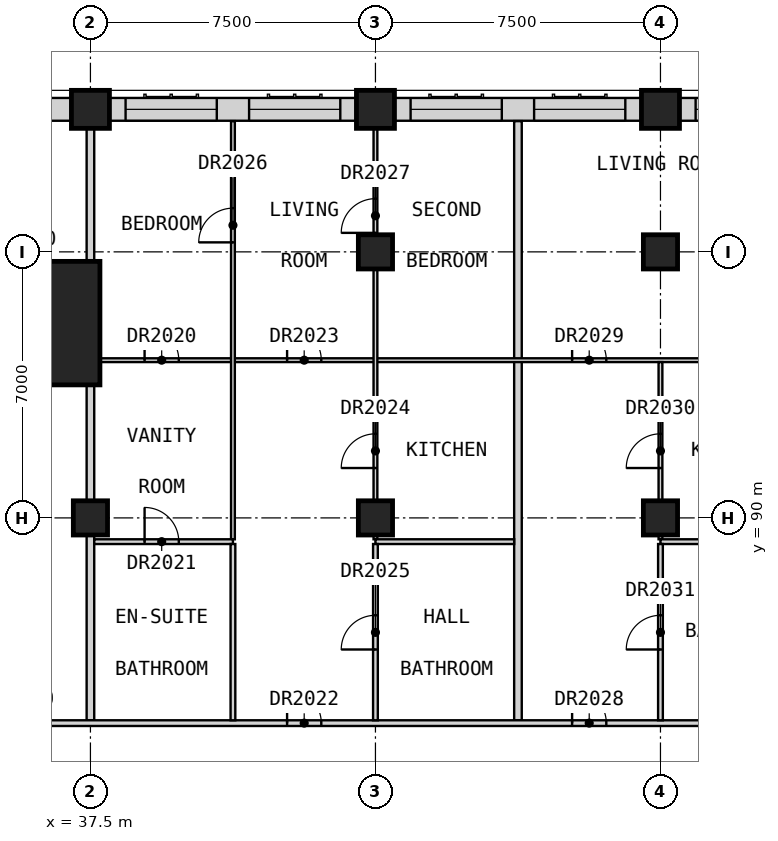
"""IFC4 building model, lengths in metres.
Left out: names, types, materials, properties, quantities, classifications, styles, units other than length and angle.
Written with IfcOpenShell. Run it as: python <this file> out.ifc"""

import sys

from ifc_helpers import new_model, si_unit, direction, frame, frame_2d, origin, origin_2d, place, context, subcontext, project, spatial, rectangle, extrude, element, fill, save


model = new_model("IFC4")
c1 = context("Model", 3, precision=1e-05, world=origin(), true_north=direction((0.0, 1.0)))
c2 = subcontext(c1, "Body", "Model", "MODEL_VIEW")
j1 = project(units=[si_unit("LENGTHUNIT", "METRE"), si_unit("PLANEANGLEUNIT", "RADIAN")], contexts=[c1])
p1 = place(None, origin())
s1 = spatial("IfcSite", under=j1, at=p1, CompositionType="ELEMENT")
p2 = place(p1, origin())
s2 = spatial("IfcBuilding", under=s1, at=p2, CompositionType="ELEMENT")
p3 = place(p2, frame((0.0, 0.0, 210.7)))
s3 = spatial("IfcBuildingStorey", under=s2, at=p3, CompositionType="ELEMENT", Elevation=210.7)
for number, where, z_axis, x_axis in (
    (1, (37.5, 100.75, 0.0), (0.0, 0.0, 1.0), (1.0, 0.0, 0.0)),
    (2, (45.0, 100.75, 0.0), (0.0, 0.0, 1.0), (1.0, 0.0, 0.0)),
    (3, (52.5, 100.75, 0.0), (0.0, 0.0, 1.0), (1.0, 0.0, 0.0)),
):
    element("IfcColumn", number, at=place(p3, frame(where, z_axis=z_axis, x_axis=x_axis)), inside=s3, PredefinedType="COLUMN", context=c2, shape_type="SweptSolid", body=[
        extrude(rectangle(XDim=1.0, YDim=1.0, at=origin_2d()), origin(), (0.0, 0.0, 1.0), 3.5),
    ])
for number, where, z_axis, x_axis in (
    (4, (37.5, 90.0, 0.0), (0.0, 0.0, 1.0), (1.0, 0.0, 0.0)),
    (5, (45.0, 90.0, 0.0), (0.0, 0.0, 1.0), (1.0, 0.0, 0.0)),
    (6, (45.0, 97.0, 0.0), (0.0, 0.0, 1.0), (1.0, 0.0, 0.0)),
    (7, (52.5, 90.0, 0.0), (0.0, 0.0, 1.0), (1.0, 0.0, 0.0)),
    (8, (52.5, 97.0, 0.0), (0.0, 0.0, 1.0), (1.0, 0.0, 0.0)),
):
    element("IfcColumn", number, at=place(p3, frame(where, z_axis=z_axis, x_axis=x_axis)), inside=s3, PredefinedType="COLUMN", context=c2, shape_type="SweptSolid", body=[
        extrude(rectangle(XDim=0.9, YDim=0.9, at=origin_2d()), origin(), (0.0, 0.0, 1.0), 3.5),
    ])
p4 = place(p3, frame((36.125, 95.125, 0.0), z_axis=(0.0, 0.0, 1.0), x_axis=(1.0, 0.0, 0.0)))
e9 = element("IfcColumn", 9, at=p4, inside=s3, PredefinedType="COLUMN", context=c2, shape_type="SweptSolid", body=[
    extrude(rectangle(XDim=3.25, YDim=3.25, at=origin_2d()), origin(), (0.0, 0.0, 1.0), 3.5),
])
p5 = place(p3, frame((59.5, 100.75, 0.0), z_axis=(0.0, 0.0, 1.0), x_axis=(-1.0, 0.0, 0.0)))
e10 = element("IfcWall", 10, at=p5, inside=s3, PredefinedType="SOLIDWALL", context=c2, shape_type="SweptSolid", body=[
    extrude(rectangle(XDim=6.5, YDim=0.6, at=frame_2d((3.25, 0.0))), origin(), (0.0, 0.0, 1.0), 2.75),
])
p6 = place(p5, frame((3.675, 0.0, 0.8)))
e11 = element("IfcOpeningElement", 11, at=p6, cuts=e10, PredefinedType="OPENING", context=c2, shape_type="SweptSolid", body=[
    extrude(rectangle(XDim=2.4, YDim=1.8, at=frame_2d((1.2, 0.9))), frame((0.0, 0.31, 0.0), z_axis=(0.0, -1.0, 0.0), x_axis=(1.0, 0.0, 0.0)), (0.0, 0.0, 1.0), 0.62),
])
p7 = place(p5, frame((0.425, 0.0, 0.8)))
e12 = element("IfcOpeningElement", 12, at=p7, cuts=e10, PredefinedType="OPENING", context=c2, shape_type="SweptSolid", body=[
    extrude(rectangle(XDim=2.4, YDim=1.8, at=frame_2d((1.2, 0.9))), frame((0.0, 0.31, 0.0), z_axis=(0.0, -1.0, 0.0), x_axis=(1.0, 0.0, 0.0)), (0.0, 0.0, 1.0), 0.62),
])
p8 = place(p3, frame((52.0, 100.75, 0.0), z_axis=(0.0, 0.0, 1.0), x_axis=(-1.0, 0.0, 0.0)))
e13 = element("IfcWall", 13, at=p8, inside=s3, PredefinedType="SOLIDWALL", context=c2, shape_type="SweptSolid", body=[
    extrude(rectangle(XDim=6.5, YDim=0.6, at=frame_2d((3.25, 0.0))), origin(), (0.0, 0.0, 1.0), 2.75),
])
p9 = place(p8, frame((3.675, 0.0, 0.8)))
e14 = element("IfcOpeningElement", 14, at=p9, cuts=e13, PredefinedType="OPENING", context=c2, shape_type="SweptSolid", body=[
    extrude(rectangle(XDim=2.4, YDim=1.8, at=frame_2d((1.2, 0.9))), frame((0.0, 0.31, 0.0), z_axis=(0.0, -1.0, 0.0), x_axis=(1.0, 0.0, 0.0)), (0.0, 0.0, 1.0), 0.62),
])
p10 = place(p8, frame((0.425, 0.0, 0.8)))
e15 = element("IfcOpeningElement", 15, at=p10, cuts=e13, PredefinedType="OPENING", context=c2, shape_type="SweptSolid", body=[
    extrude(rectangle(XDim=2.4, YDim=1.8, at=frame_2d((1.2, 0.9))), frame((0.0, 0.31, 0.0), z_axis=(0.0, -1.0, 0.0), x_axis=(1.0, 0.0, 0.0)), (0.0, 0.0, 1.0), 0.62),
])
p11 = place(p3, frame((44.5, 100.75, 0.0), z_axis=(0.0, 0.0, 1.0), x_axis=(-1.0, 0.0, 0.0)))
e16 = element("IfcWall", 16, at=p11, inside=s3, PredefinedType="SOLIDWALL", context=c2, shape_type="SweptSolid", body=[
    extrude(rectangle(XDim=6.5, YDim=0.6, at=frame_2d((3.25, 0.0))), origin(), (0.0, 0.0, 1.0), 2.75),
])
p12 = place(p11, frame((3.675, 0.0, 0.8)))
e17 = element("IfcOpeningElement", 17, at=p12, cuts=e16, PredefinedType="OPENING", context=c2, shape_type="SweptSolid", body=[
    extrude(rectangle(XDim=2.4, YDim=1.8, at=frame_2d((1.2, 0.9))), frame((0.0, 0.31, 0.0), z_axis=(0.0, -1.0, 0.0), x_axis=(1.0, 0.0, 0.0)), (0.0, 0.0, 1.0), 0.62),
])
p13 = place(p11, frame((0.425, 0.0, 0.8)))
e18 = element("IfcOpeningElement", 18, at=p13, cuts=e16, PredefinedType="OPENING", context=c2, shape_type="SweptSolid", body=[
    extrude(rectangle(XDim=2.4, YDim=1.8, at=frame_2d((1.2, 0.9))), frame((0.0, 0.31, 0.0), z_axis=(0.0, -1.0, 0.0), x_axis=(1.0, 0.0, 0.0)), (0.0, 0.0, 1.0), 0.62),
])
p14 = place(p3, frame((37.0, 100.75, 0.0), z_axis=(0.0, 0.0, 1.0), x_axis=(-1.0, 0.0, 0.0)))
e19 = element("IfcWall", 19, at=p14, inside=s3, PredefinedType="SOLIDWALL", context=c2, shape_type="SweptSolid", body=[
    extrude(rectangle(XDim=2.5, YDim=0.6, at=frame_2d((1.25, 0.0))), origin(), (0.0, 0.0, 1.0), 3.1),
])
p15 = place(p3, frame((37.5, 84.675, 0.0), z_axis=(0.0, 0.0, 1.0), x_axis=(0.0, 1.0, 0.0)))
e20 = element("IfcWall", 20, at=p15, inside=s3, PredefinedType="PARTITIONING", context=c2, shape_type="SweptSolid", body=[
    extrude(rectangle(XDim=16.575, YDim=0.2, at=frame_2d((8.288, 0.0))), origin(), (0.0, 0.0, 1.0), 2.75),
])
p16 = place(p3, frame((48.75, 84.675, 0.0), z_axis=(0.0, 0.0, 1.0), x_axis=(0.0, 1.0, 0.0)))
e21 = element("IfcWall", 21, at=p16, inside=s3, PredefinedType="PARTITIONING", context=c2, shape_type="SweptSolid", body=[
    extrude(rectangle(XDim=15.765, YDim=0.2, at=frame_2d((7.882, 0.0))), origin(), (0.0, 0.0, 1.0), 3.1),
])
p17 = place(p3, frame((33.75, 84.6, 0.0), z_axis=(0.0, 0.0, 1.0), x_axis=(1.0, 0.0, 0.0)))
e22 = element("IfcWall", 22, at=p17, inside=s3, PredefinedType="PARTITIONING", context=c2, shape_type="SweptSolid", body=[
    extrude(rectangle(XDim=28.35, YDim=0.15, at=frame_2d((14.175, 0.0))), origin(), (0.0, 0.0, 1.0), 3.1),
])
p18 = place(p17, frame((1.375, 0.0, 0.0)))
e23 = element("IfcOpeningElement", 23, at=p18, cuts=e22, PredefinedType="OPENING", context=c2, shape_type="SweptSolid", body=[
    extrude(rectangle(XDim=1.0, YDim=2.1, at=frame_2d((0.5, 1.05))), frame((0.0, 0.085, 0.0), z_axis=(0.0, -1.0, 0.0), x_axis=(1.0, 0.0, 0.0)), (0.0, 0.0, 1.0), 0.17),
])
p19 = place(p17, frame((8.925, 0.0, 0.0)))
e24 = element("IfcOpeningElement", 24, at=p19, cuts=e22, PredefinedType="OPENING", context=c2, shape_type="SweptSolid", body=[
    extrude(rectangle(XDim=0.9, YDim=2.1, at=frame_2d((0.45, 1.05))), frame((0.0, 0.085, 0.0), z_axis=(0.0, -1.0, 0.0), x_axis=(1.0, 0.0, 0.0)), (0.0, 0.0, 1.0), 0.17),
])
p20 = place(p17, frame((16.425, 0.0, 0.0)))
e25 = element("IfcOpeningElement", 25, at=p20, cuts=e22, PredefinedType="OPENING", context=c2, shape_type="SweptSolid", body=[
    extrude(rectangle(XDim=0.9, YDim=2.1, at=frame_2d((0.45, 1.05))), frame((0.0, 0.085, 0.0), z_axis=(0.0, -1.0, 0.0), x_axis=(1.0, 0.0, 0.0)), (0.0, 0.0, 1.0), 0.17),
])
p21 = place(p3, frame((37.6, 94.15, 0.0), z_axis=(0.0, 0.0, 1.0), x_axis=(1.0, 0.0, 0.0)))
e26 = element("IfcWall", 26, at=p21, inside=s3, PredefinedType="PARTITIONING", context=c2, shape_type="SweptSolid", body=[
    extrude(rectangle(XDim=22.3, YDim=0.1, at=frame_2d((11.15, 0.0))), origin(), (0.0, 0.0, 1.0), 3.1),
])
p22 = place(p21, frame((1.325, 0.0, 0.0)))
e27 = element("IfcOpeningElement", 27, at=p22, cuts=e26, PredefinedType="OPENING", context=c2, shape_type="SweptSolid", body=[
    extrude(rectangle(XDim=0.9, YDim=2.1, at=frame_2d((0.45, 1.05))), frame((0.0, 0.06, 0.0), z_axis=(0.0, -1.0, 0.0), x_axis=(1.0, 0.0, 0.0)), (0.0, 0.0, 1.0), 0.12),
])
p23 = place(p21, frame((5.075, 0.0, 0.0)))
e28 = element("IfcOpeningElement", 28, at=p23, cuts=e26, PredefinedType="OPENING", context=c2, shape_type="SweptSolid", body=[
    extrude(rectangle(XDim=0.9, YDim=2.1, at=frame_2d((0.45, 1.05))), frame((0.0, 0.06, 0.0), z_axis=(0.0, -1.0, 0.0), x_axis=(1.0, 0.0, 0.0)), (0.0, 0.0, 1.0), 0.12),
])
p24 = place(p21, frame((12.575, 0.0, 0.0)))
e29 = element("IfcOpeningElement", 29, at=p24, cuts=e26, PredefinedType="OPENING", context=c2, shape_type="SweptSolid", body=[
    extrude(rectangle(XDim=0.9, YDim=2.1, at=frame_2d((0.45, 1.05))), frame((0.0, 0.06, 0.0), z_axis=(0.0, -1.0, 0.0), x_axis=(1.0, 0.0, 0.0)), (0.0, 0.0, 1.0), 0.12),
])
p25 = place(p21, frame((20.075, 0.0, 0.0)))
e30 = element("IfcOpeningElement", 30, at=p25, cuts=e26, PredefinedType="OPENING", context=c2, shape_type="SweptSolid", body=[
    extrude(rectangle(XDim=0.9, YDim=2.1, at=frame_2d((0.45, 1.05))), frame((0.0, 0.06, 0.0), z_axis=(0.0, -1.0, 0.0), x_axis=(1.0, 0.0, 0.0)), (0.0, 0.0, 1.0), 0.12),
])
p26 = place(p3, frame((41.25, 89.438, 0.0), z_axis=(0.0, 0.0, 1.0), x_axis=(0.0, 1.0, 0.0)))
e31 = element("IfcWall", 31, at=p26, inside=s3, PredefinedType="PARTITIONING", context=c2, shape_type="SweptSolid", body=[
    extrude(rectangle(XDim=11.002, YDim=0.1, at=frame_2d((5.501, 0.0))), origin(), (0.0, 0.0, 1.0), 3.1),
])
p27 = place(p26, frame((7.812, 0.0, 0.0)))
e32 = element("IfcOpeningElement", 32, at=p27, cuts=e31, PredefinedType="OPENING", context=c2, shape_type="SweptSolid", body=[
    extrude(rectangle(XDim=0.9, YDim=2.1, at=frame_2d((0.45, 1.05))), frame((0.0, 0.06, 0.0), z_axis=(0.0, -1.0, 0.0), x_axis=(1.0, 0.0, 0.0)), (0.0, 0.0, 1.0), 0.12),
])
p28 = place(p3, frame((45.0, 89.438, 0.0), z_axis=(0.0, 0.0, 1.0), x_axis=(0.0, 1.0, 0.0)))
e33 = element("IfcWall", 33, at=p28, inside=s3, PredefinedType="PARTITIONING", context=c2, shape_type="SweptSolid", body=[
    extrude(rectangle(XDim=11.812, YDim=0.1, at=frame_2d((5.906, 0.0))), origin(), (0.0, 0.0, 1.0), 3.1),
])
p29 = place(p28, frame((1.875, 0.0, 0.0)))
e34 = element("IfcOpeningElement", 34, at=p29, cuts=e33, PredefinedType="OPENING", context=c2, shape_type="SweptSolid", body=[
    extrude(rectangle(XDim=0.9, YDim=2.1, at=frame_2d((0.45, 1.05))), frame((0.0, 0.06, 0.0), z_axis=(0.0, -1.0, 0.0), x_axis=(1.0, 0.0, 0.0)), (0.0, 0.0, 1.0), 0.12),
])
p30 = place(p28, frame((8.062, 0.0, 0.0)))
e35 = element("IfcOpeningElement", 35, at=p30, cuts=e33, PredefinedType="OPENING", context=c2, shape_type="SweptSolid", body=[
    extrude(rectangle(XDim=0.9, YDim=2.1, at=frame_2d((0.45, 1.05))), frame((0.0, 0.06, 0.0), z_axis=(0.0, -1.0, 0.0), x_axis=(1.0, 0.0, 0.0)), (0.0, 0.0, 1.0), 0.12),
])
p31 = place(p3, frame((52.5, 89.438, 0.0), z_axis=(0.0, 0.0, 1.0), x_axis=(0.0, 1.0, 0.0)))
e36 = element("IfcWall", 36, at=p31, inside=s3, PredefinedType="PARTITIONING", context=c2, shape_type="SweptSolid", body=[
    extrude(rectangle(XDim=4.663, YDim=0.1, at=frame_2d((2.331, 0.0))), origin(), (0.0, 0.0, 1.0), 3.1),
])
p32 = place(p31, frame((1.875, 0.0, 0.0)))
e37 = element("IfcOpeningElement", 37, at=p32, cuts=e36, PredefinedType="OPENING", context=c2, shape_type="SweptSolid", body=[
    extrude(rectangle(XDim=0.9, YDim=2.1, at=frame_2d((0.45, 1.05))), frame((0.0, 0.06, 0.0), z_axis=(0.0, -1.0, 0.0), x_axis=(1.0, 0.0, 0.0)), (0.0, 0.0, 1.0), 0.12),
])
p33 = place(p3, frame((37.6, 89.375, 0.0), z_axis=(0.0, 0.0, 1.0), x_axis=(1.0, 0.0, 0.0)))
e38 = element("IfcWall", 38, at=p33, inside=s3, PredefinedType="PARTITIONING", context=c2, shape_type="SweptSolid", body=[
    extrude(rectangle(XDim=3.65, YDim=0.125, at=frame_2d((1.825, 0.0))), origin(), (0.0, 0.0, 1.0), 3.1),
])
p34 = place(p33, frame((1.325, 0.0, 0.0)))
e39 = element("IfcOpeningElement", 39, at=p34, cuts=e38, PredefinedType="OPENING", context=c2, shape_type="SweptSolid", body=[
    extrude(rectangle(XDim=0.9, YDim=2.1, at=frame_2d((0.45, 1.05))), frame((0.0, 0.073, 0.0), z_axis=(0.0, -1.0, 0.0), x_axis=(1.0, 0.0, 0.0)), (0.0, 0.0, 1.0), 0.145),
])
p35 = place(p3, frame((45.0, 89.375, 0.0), z_axis=(0.0, 0.0, 1.0), x_axis=(1.0, 0.0, 0.0)))
e40 = element("IfcWall", 40, at=p35, inside=s3, PredefinedType="PARTITIONING", context=c2, shape_type="SweptSolid", body=[
    extrude(rectangle(XDim=3.65, YDim=0.125, at=frame_2d((1.825, 0.0))), origin(), (0.0, 0.0, 1.0), 3.1),
])
p36 = place(p3, frame((52.5, 89.375, 0.0), z_axis=(0.0, 0.0, 1.0), x_axis=(1.0, 0.0, 0.0)))
e41 = element("IfcWall", 41, at=p36, inside=s3, PredefinedType="PARTITIONING", context=c2, shape_type="SweptSolid", body=[
    extrude(rectangle(XDim=7.4, YDim=0.125, at=frame_2d((3.7, 0.0))), origin(), (0.0, 0.0, 1.0), 3.1),
])
p37 = place(p36, frame((5.175, 0.0, 0.0)))
e42 = element("IfcOpeningElement", 42, at=p37, cuts=e41, PredefinedType="OPENING", context=c2, shape_type="SweptSolid", body=[
    extrude(rectangle(XDim=0.9, YDim=2.1, at=frame_2d((0.45, 1.05))), frame((0.0, 0.073, 0.0), z_axis=(0.0, -1.0, 0.0), x_axis=(1.0, 0.0, 0.0)), (0.0, 0.0, 1.0), 0.145),
])
p38 = place(p3, frame((41.25, 84.675, 0.0), z_axis=(0.0, 0.0, 1.0), x_axis=(0.0, 1.0, 0.0)))
e43 = element("IfcWall", 43, at=p38, inside=s3, PredefinedType="PARTITIONING", context=c2, shape_type="SweptSolid", body=[
    extrude(rectangle(XDim=4.637, YDim=0.125, at=frame_2d((2.319, 0.0))), origin(), (0.0, 0.0, 1.0), 3.1),
])
p39 = place(p3, frame((45.0, 84.675, 0.0), z_axis=(0.0, 0.0, 1.0), x_axis=(0.0, 1.0, 0.0)))
e44 = element("IfcWall", 44, at=p39, inside=s3, PredefinedType="PARTITIONING", context=c2, shape_type="SweptSolid", body=[
    extrude(rectangle(XDim=4.637, YDim=0.125, at=frame_2d((2.319, 0.0))), origin(), (0.0, 0.0, 1.0), 3.1),
])
p40 = place(p39, frame((1.863, 0.0, 0.0)))
e45 = element("IfcOpeningElement", 45, at=p40, cuts=e44, PredefinedType="OPENING", context=c2, shape_type="SweptSolid", body=[
    extrude(rectangle(XDim=0.9, YDim=2.1, at=frame_2d((0.45, 1.05))), frame((0.0, 0.073, 0.0), z_axis=(0.0, -1.0, 0.0), x_axis=(1.0, 0.0, 0.0)), (0.0, 0.0, 1.0), 0.145),
])
p41 = place(p3, frame((52.5, 84.675, 0.0), z_axis=(0.0, 0.0, 1.0), x_axis=(0.0, 1.0, 0.0)))
e46 = element("IfcWall", 46, at=p41, inside=s3, PredefinedType="PARTITIONING", context=c2, shape_type="SweptSolid", body=[
    extrude(rectangle(XDim=4.637, YDim=0.125, at=frame_2d((2.319, 0.0))), origin(), (0.0, 0.0, 1.0), 3.1),
])
p42 = place(p41, frame((1.863, 0.0, 0.0)))
e47 = element("IfcOpeningElement", 47, at=p42, cuts=e46, PredefinedType="OPENING", context=c2, shape_type="SweptSolid", body=[
    extrude(rectangle(XDim=0.9, YDim=2.1, at=frame_2d((0.45, 1.05))), frame((0.0, 0.073, 0.0), z_axis=(0.0, -1.0, 0.0), x_axis=(1.0, 0.0, 0.0)), (0.0, 0.0, 1.0), 0.145),
])
p43 = place(p6, origin())
e48 = element("IfcWindow", 48, at=p43, inside=s3, PartitioningType="SINGLE_PANEL", PredefinedType="WINDOW", context=c2, shape_type="SweptSolid", body=[
    extrude(rectangle(XDim=2.4, YDim=1.8, at=frame_2d((1.2, 0.9))), frame((0.0, -0.07, 0.0), z_axis=(0.0, -1.0, 0.0), x_axis=(1.0, 0.0, 0.0)), (0.0, 0.0, 1.0), 0.06),
])
fill(e11, e48)
p44 = place(p9, origin())
e49 = element("IfcWindow", 49, at=p44, inside=s3, PartitioningType="SINGLE_PANEL", PredefinedType="WINDOW", context=c2, shape_type="SweptSolid", body=[
    extrude(rectangle(XDim=2.4, YDim=1.8, at=frame_2d((1.2, 0.9))), frame((0.0, -0.07, 0.0), z_axis=(0.0, -1.0, 0.0), x_axis=(1.0, 0.0, 0.0)), (0.0, 0.0, 1.0), 0.06),
])
fill(e14, e49)
p45 = place(p10, origin())
e50 = element("IfcWindow", 50, at=p45, inside=s3, PartitioningType="SINGLE_PANEL", PredefinedType="WINDOW", context=c2, shape_type="SweptSolid", body=[
    extrude(rectangle(XDim=2.4, YDim=1.8, at=frame_2d((1.2, 0.9))), frame((0.0, -0.07, 0.0), z_axis=(0.0, -1.0, 0.0), x_axis=(1.0, 0.0, 0.0)), (0.0, 0.0, 1.0), 0.06),
])
fill(e15, e50)
p46 = place(p12, origin())
e51 = element("IfcWindow", 51, at=p46, inside=s3, PartitioningType="SINGLE_PANEL", PredefinedType="WINDOW", context=c2, shape_type="SweptSolid", body=[
    extrude(rectangle(XDim=2.4, YDim=1.8, at=frame_2d((1.2, 0.9))), frame((0.0, -0.07, 0.0), z_axis=(0.0, -1.0, 0.0), x_axis=(1.0, 0.0, 0.0)), (0.0, 0.0, 1.0), 0.06),
])
fill(e17, e51)
p47 = place(p13, origin())
e52 = element("IfcWindow", 52, at=p47, inside=s3, PartitioningType="SINGLE_PANEL", PredefinedType="WINDOW", context=c2, shape_type="SweptSolid", body=[
    extrude(rectangle(XDim=2.4, YDim=1.8, at=frame_2d((1.2, 0.9))), frame((0.0, -0.07, 0.0), z_axis=(0.0, -1.0, 0.0), x_axis=(1.0, 0.0, 0.0)), (0.0, 0.0, 1.0), 0.06),
])
fill(e18, e52)
p48 = place(p22, origin())
e53 = element("IfcDoor", 53, at=p48, inside=s3, OperationType="SINGLE_SWING_RIGHT", PredefinedType="DOOR", context=c2, shape_type="SweptSolid", body=[
    extrude(rectangle(XDim=0.9, YDim=2.1, at=frame_2d((0.45, 1.05))), frame((0.0, 0.025, 0.0), z_axis=(0.0, -1.0, 0.0), x_axis=(1.0, 0.0, 0.0)), (0.0, 0.0, 1.0), 0.05),
])
fill(e27, e53)
p49 = place(p34, origin())
e54 = element("IfcDoor", 54, at=p49, inside=s3, OperationType="SINGLE_SWING_RIGHT", PredefinedType="DOOR", context=c2, shape_type="SweptSolid", body=[
    extrude(rectangle(XDim=0.9, YDim=2.1, at=frame_2d((0.45, 1.05))), frame((0.0, 0.025, 0.0), z_axis=(0.0, -1.0, 0.0), x_axis=(1.0, 0.0, 0.0)), (0.0, 0.0, 1.0), 0.05),
])
fill(e39, e54)
p50 = place(p19, origin())
e55 = element("IfcDoor", 55, at=p50, inside=s3, OperationType="SINGLE_SWING_LEFT", PredefinedType="DOOR", context=c2, shape_type="SweptSolid", body=[
    extrude(rectangle(XDim=0.9, YDim=2.1, at=frame_2d((0.45, 1.05))), frame((0.0, 0.025, 0.0), z_axis=(0.0, -1.0, 0.0), x_axis=(1.0, 0.0, 0.0)), (0.0, 0.0, 1.0), 0.05),
])
fill(e24, e55)
p51 = place(p23, origin())
e56 = element("IfcDoor", 56, at=p51, inside=s3, OperationType="SINGLE_SWING_RIGHT", PredefinedType="DOOR", context=c2, shape_type="SweptSolid", body=[
    extrude(rectangle(XDim=0.9, YDim=2.1, at=frame_2d((0.45, 1.05))), frame((0.0, 0.025, 0.0), z_axis=(0.0, -1.0, 0.0), x_axis=(1.0, 0.0, 0.0)), (0.0, 0.0, 1.0), 0.05),
])
fill(e28, e56)
p52 = place(p29, origin())
e57 = element("IfcDoor", 57, at=p52, inside=s3, OperationType="SINGLE_SWING_LEFT", PredefinedType="DOOR", context=c2, shape_type="SweptSolid", body=[
    extrude(rectangle(XDim=0.9, YDim=2.1, at=frame_2d((0.45, 1.05))), frame((0.0, 0.025, 0.0), z_axis=(0.0, -1.0, 0.0), x_axis=(1.0, 0.0, 0.0)), (0.0, 0.0, 1.0), 0.05),
])
fill(e34, e57)
p53 = place(p40, origin())
e58 = element("IfcDoor", 58, at=p53, inside=s3, OperationType="SINGLE_SWING_RIGHT", PredefinedType="DOOR", context=c2, shape_type="SweptSolid", body=[
    extrude(rectangle(XDim=0.9, YDim=2.1, at=frame_2d((0.45, 1.05))), frame((0.0, 0.025, 0.0), z_axis=(0.0, -1.0, 0.0), x_axis=(1.0, 0.0, 0.0)), (0.0, 0.0, 1.0), 0.05),
])
fill(e45, e58)
p54 = place(p27, origin())
e59 = element("IfcDoor", 59, at=p54, inside=s3, OperationType="SINGLE_SWING_RIGHT", PredefinedType="DOOR", context=c2, shape_type="SweptSolid", body=[
    extrude(rectangle(XDim=0.9, YDim=2.1, at=frame_2d((0.45, 1.05))), frame((0.0, 0.025, 0.0), z_axis=(0.0, -1.0, 0.0), x_axis=(1.0, 0.0, 0.0)), (0.0, 0.0, 1.0), 0.05),
])
fill(e32, e59)
p55 = place(p30, origin())
e60 = element("IfcDoor", 60, at=p55, inside=s3, OperationType="SINGLE_SWING_RIGHT", PredefinedType="DOOR", context=c2, shape_type="SweptSolid", body=[
    extrude(rectangle(XDim=0.9, YDim=2.1, at=frame_2d((0.45, 1.05))), frame((0.0, 0.025, 0.0), z_axis=(0.0, -1.0, 0.0), x_axis=(1.0, 0.0, 0.0)), (0.0, 0.0, 1.0), 0.05),
])
fill(e35, e60)
p56 = place(p20, origin())
e61 = element("IfcDoor", 61, at=p56, inside=s3, OperationType="SINGLE_SWING_LEFT", PredefinedType="DOOR", context=c2, shape_type="SweptSolid", body=[
    extrude(rectangle(XDim=0.9, YDim=2.1, at=frame_2d((0.45, 1.05))), frame((0.0, 0.025, 0.0), z_axis=(0.0, -1.0, 0.0), x_axis=(1.0, 0.0, 0.0)), (0.0, 0.0, 1.0), 0.05),
])
fill(e25, e61)
p57 = place(p24, origin())
e62 = element("IfcDoor", 62, at=p57, inside=s3, OperationType="SINGLE_SWING_RIGHT", PredefinedType="DOOR", context=c2, shape_type="SweptSolid", body=[
    extrude(rectangle(XDim=0.9, YDim=2.1, at=frame_2d((0.45, 1.05))), frame((0.0, 0.025, 0.0), z_axis=(0.0, -1.0, 0.0), x_axis=(1.0, 0.0, 0.0)), (0.0, 0.0, 1.0), 0.05),
])
fill(e29, e62)
p58 = place(p32, origin())
e63 = element("IfcDoor", 63, at=p58, inside=s3, OperationType="SINGLE_SWING_LEFT", PredefinedType="DOOR", context=c2, shape_type="SweptSolid", body=[
    extrude(rectangle(XDim=0.9, YDim=2.1, at=frame_2d((0.45, 1.05))), frame((0.0, 0.025, 0.0), z_axis=(0.0, -1.0, 0.0), x_axis=(1.0, 0.0, 0.0)), (0.0, 0.0, 1.0), 0.05),
])
fill(e37, e63)
p59 = place(p42, origin())
e64 = element("IfcDoor", 64, at=p59, inside=s3, OperationType="SINGLE_SWING_RIGHT", PredefinedType="DOOR", context=c2, shape_type="SweptSolid", body=[
    extrude(rectangle(XDim=0.9, YDim=2.1, at=frame_2d((0.45, 1.05))), frame((0.0, 0.025, 0.0), z_axis=(0.0, -1.0, 0.0), x_axis=(1.0, 0.0, 0.0)), (0.0, 0.0, 1.0), 0.05),
])
fill(e47, e64)
save(model, sys.argv[1])
